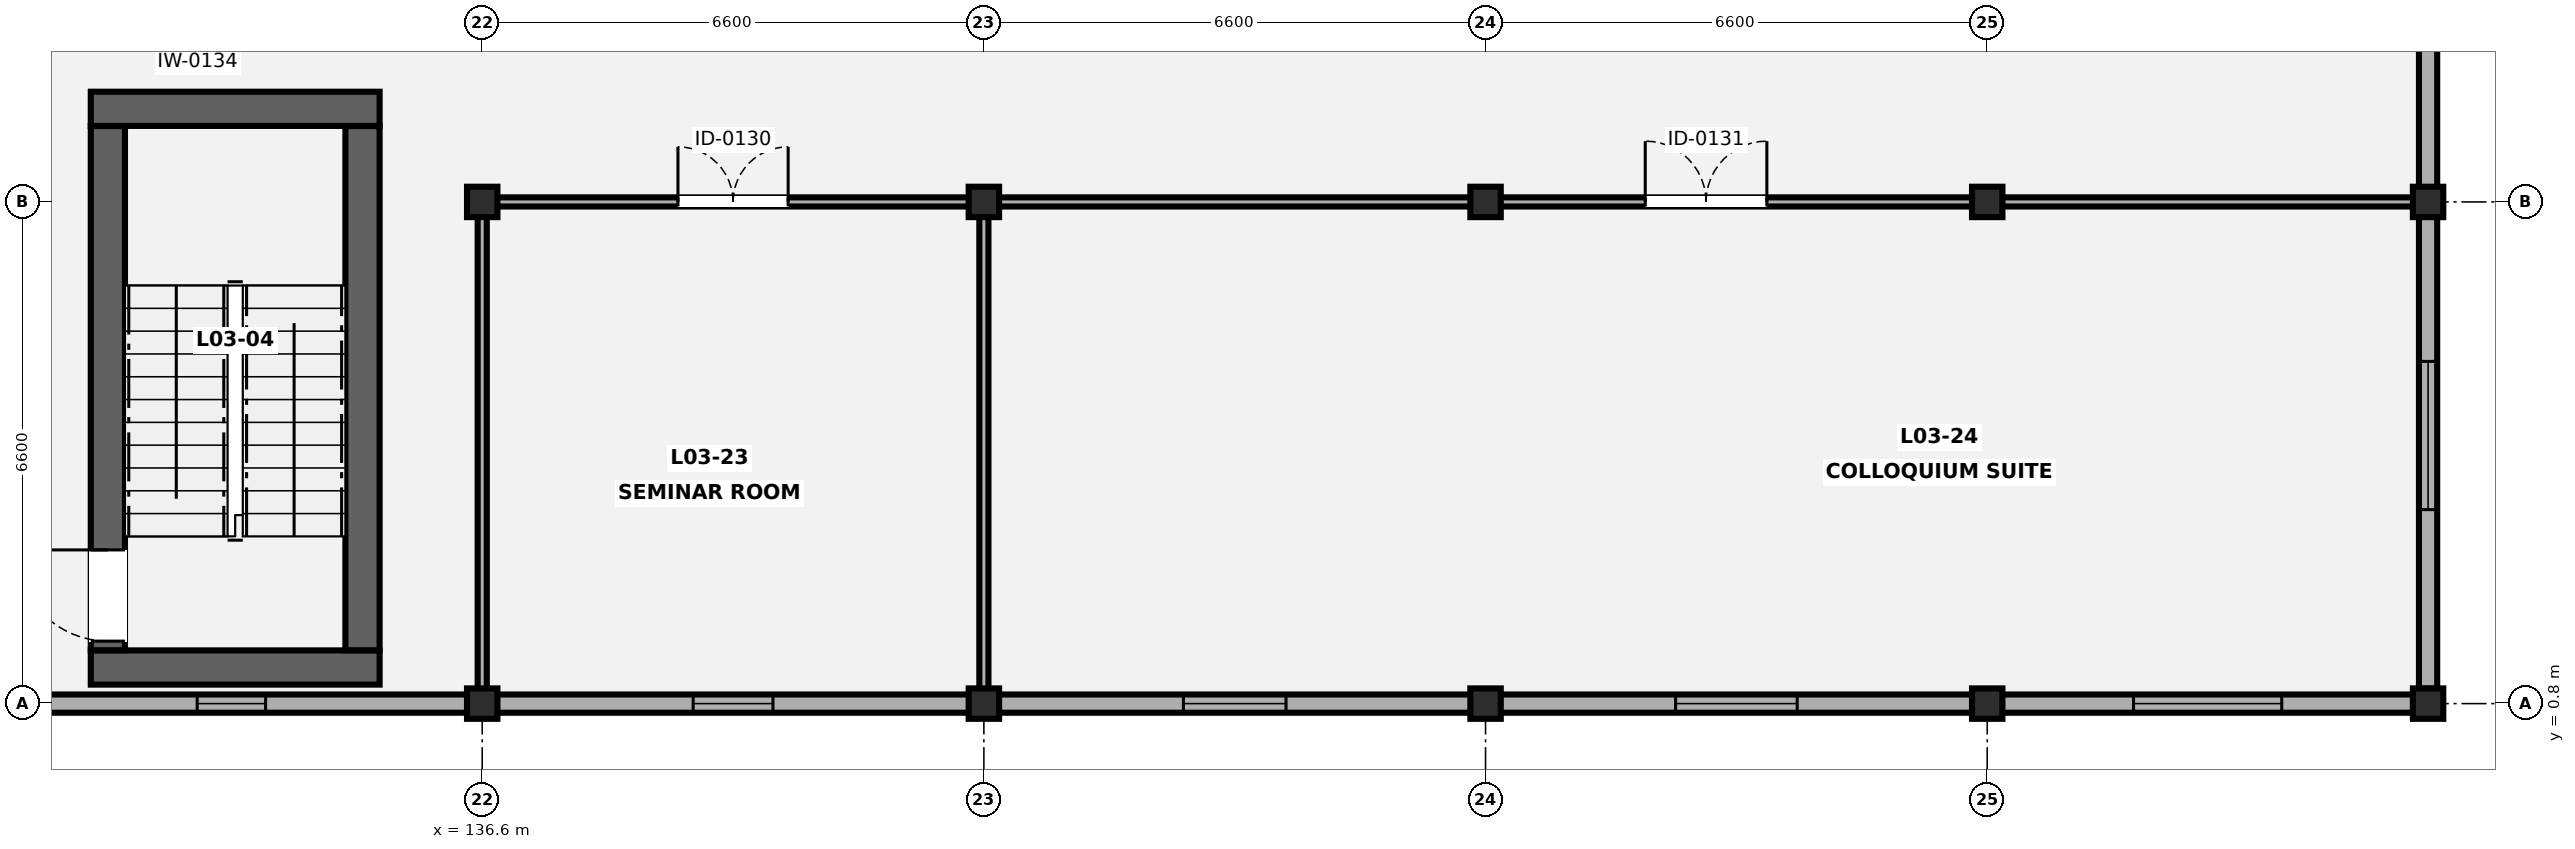
"""IFC4 building model, lengths in metres.
Left out: names, types, materials, properties, quantities, classifications, styles, units other than length and angle.
Written with IfcOpenShell. Run it as: python <this file> out.ifc"""

import sys

from ifc_helpers import new_model, si_unit, direction, frame, frame_2d, origin, origin_2d, place, context, subcontext, project, spatial, rectangle, i_section, extrude, element, fill, save


model = new_model("IFC4")
c1 = context("Model", 3, precision=1e-05, world=origin(), true_north=direction((0.0, 1.0)))
c2 = subcontext(c1, "Body", "Model", "MODEL_VIEW")
j1 = project(units=[si_unit("LENGTHUNIT", "METRE"), si_unit("PLANEANGLEUNIT", "RADIAN")], contexts=[c1])
p1 = place(None, origin())
s1 = spatial("IfcSite", under=j1, at=p1, CompositionType="ELEMENT")
p2 = place(p1, origin())
s2 = spatial("IfcBuilding", under=s1, at=p2, CompositionType="ELEMENT")
p3 = place(p2, frame((0.0, 0.0, 13.3)))
s3 = spatial("IfcBuildingStorey", under=s2, at=p3, CompositionType="ELEMENT", Elevation=13.3)
for number, where, z_axis, x_axis in (
    (1, (136.6, 0.8, 0.0), (0.0, 0.0, 1.0), (1.0, 0.0, 0.0)),
    (2, (136.6, 7.4, 0.0), (0.0, 0.0, 1.0), (1.0, 0.0, 0.0)),
    (3, (143.2, 0.8, 0.0), (0.0, 0.0, 1.0), (1.0, 0.0, 0.0)),
    (4, (143.2, 7.4, 0.0), (0.0, 0.0, 1.0), (1.0, 0.0, 0.0)),
    (5, (149.8, 0.8, 0.0), (0.0, 0.0, 1.0), (1.0, 0.0, 0.0)),
    (6, (149.8, 7.4, 0.0), (0.0, 0.0, 1.0), (1.0, 0.0, 0.0)),
    (7, (156.4, 0.8, 0.0), (0.0, 0.0, 1.0), (1.0, 0.0, 0.0)),
    (8, (156.4, 7.4, 0.0), (0.0, 0.0, 1.0), (1.0, 0.0, 0.0)),
    (9, (162.2, 0.8, 0.0), (0.0, 0.0, 1.0), (1.0, 0.0, 0.0)),
    (10, (162.2, 7.4, 0.0), (0.0, 0.0, 1.0), (1.0, 0.0, 0.0)),
):
    element("IfcColumn", number, at=place(p3, frame(where, z_axis=z_axis, x_axis=x_axis)), inside=s3, PredefinedType="COLUMN", context=c2, shape_type="SweptSolid", body=[
        extrude(i_section(OverallWidth=0.4, OverallDepth=0.4, WebThickness=0.02, FlangeThickness=0.035, FilletRadius=0.016, at=origin_2d()), origin(), (0.0, 0.0, 1.0), 4.2),
    ])
p4 = place(p3, frame((162.2, 20.402, 0.0), z_axis=(0.0, 0.0, 1.0), x_axis=(0.0, -1.0, 0.0)))
e11 = element("IfcWall", 11, at=p4, inside=s3, PredefinedType="SOLIDWALL", context=c2, shape_type="SweptSolid", body=[
    extrude(rectangle(XDim=19.404, YDim=0.24, at=frame_2d((9.702, 0.0))), origin(), (0.0, 0.0, 1.0), 3.372),
])
p5 = place(p4, frame((2.4, 0.0, 0.85)))
e12 = element("IfcOpeningElement", 12, at=p5, cuts=e11, PredefinedType="OPENING", context=c2, shape_type="SweptSolid", body=[
    extrude(rectangle(XDim=1.55, YDim=1.4, at=frame_2d((0.775, 0.7))), frame((0.0, 0.13, 0.0), z_axis=(0.0, -1.0, 0.0), x_axis=(1.0, 0.0, 0.0)), (0.0, 0.0, 1.0), 0.26),
])
p6 = place(p4, frame((15.1, 0.0, 0.85)))
e13 = element("IfcOpeningElement", 13, at=p6, cuts=e11, PredefinedType="OPENING", context=c2, shape_type="SweptSolid", body=[
    extrude(rectangle(XDim=1.95, YDim=1.5, at=frame_2d((0.975, 0.75))), frame((0.0, 0.13, 0.0), z_axis=(0.0, -1.0, 0.0), x_axis=(1.0, 0.0, 0.0)), (0.0, 0.0, 1.0), 0.26),
])
p7 = place(p3, frame((162.002, 0.8, 0.0), z_axis=(0.0, 0.0, 1.0), x_axis=(-1.0, 0.0, 0.0)))
e14 = element("IfcWall", 14, at=p7, inside=s3, PredefinedType="SOLIDWALL", context=c2, shape_type="SweptSolid", body=[
    extrude(rectangle(XDim=58.204, YDim=0.24, at=frame_2d((29.102, 0.0))), origin(), (0.0, 0.0, 1.0), 3.505),
])
p8 = place(p7, frame((54.277, 0.0, 0.85)))
e15 = element("IfcOpeningElement", 15, at=p8, cuts=e14, PredefinedType="OPENING", context=c2, shape_type="SweptSolid", body=[
    extrude(rectangle(XDim=1.65, YDim=1.25, at=frame_2d((0.825, 0.625))), frame((0.0, 0.13, 0.0), z_axis=(0.0, -1.0, 0.0), x_axis=(1.0, 0.0, 0.0)), (0.0, 0.0, 1.0), 0.26),
])
p9 = place(p7, frame((47.552, 0.0, 0.85)))
e16 = element("IfcOpeningElement", 16, at=p9, cuts=e14, PredefinedType="OPENING", context=c2, shape_type="SweptSolid", body=[
    extrude(rectangle(XDim=1.9, YDim=1.25, at=frame_2d((0.95, 0.625))), frame((0.0, 0.13, 0.0), z_axis=(0.0, -1.0, 0.0), x_axis=(1.0, 0.0, 0.0)), (0.0, 0.0, 1.0), 0.26),
])
p10 = place(p7, frame((40.802, 0.0, 0.85)))
e17 = element("IfcOpeningElement", 17, at=p10, cuts=e14, PredefinedType="OPENING", context=c2, shape_type="SweptSolid", body=[
    extrude(rectangle(XDim=2.2, YDim=1.25, at=frame_2d((1.1, 0.625))), frame((0.0, 0.13, 0.0), z_axis=(0.0, -1.0, 0.0), x_axis=(1.0, 0.0, 0.0)), (0.0, 0.0, 1.0), 0.26),
])
p11 = place(p7, frame((34.052, 0.0, 0.85)))
e18 = element("IfcOpeningElement", 18, at=p11, cuts=e14, PredefinedType="OPENING", context=c2, shape_type="SweptSolid", body=[
    extrude(rectangle(XDim=2.5, YDim=1.25, at=frame_2d((1.25, 0.625))), frame((0.0, 0.13, 0.0), z_axis=(0.0, -1.0, 0.0), x_axis=(1.0, 0.0, 0.0)), (0.0, 0.0, 1.0), 0.26),
])
p12 = place(p7, frame((28.252, 0.0, 0.85)))
e19 = element("IfcOpeningElement", 19, at=p12, cuts=e14, PredefinedType="OPENING", context=c2, shape_type="SweptSolid", body=[
    extrude(rectangle(XDim=0.9, YDim=1.35, at=frame_2d((0.45, 0.675))), frame((0.0, 0.13, 0.0), z_axis=(0.0, -1.0, 0.0), x_axis=(1.0, 0.0, 0.0)), (0.0, 0.0, 1.0), 0.26),
])
p13 = place(p7, frame((21.577, 0.0, 0.85)))
e20 = element("IfcOpeningElement", 20, at=p13, cuts=e14, PredefinedType="OPENING", context=c2, shape_type="SweptSolid", body=[
    extrude(rectangle(XDim=1.05, YDim=1.35, at=frame_2d((0.525, 0.675))), frame((0.0, 0.13, 0.0), z_axis=(0.0, -1.0, 0.0), x_axis=(1.0, 0.0, 0.0)), (0.0, 0.0, 1.0), 0.26),
])
p14 = place(p7, frame((14.827, 0.0, 0.85)))
e21 = element("IfcOpeningElement", 21, at=p14, cuts=e14, PredefinedType="OPENING", context=c2, shape_type="SweptSolid", body=[
    extrude(rectangle(XDim=1.35, YDim=1.5, at=frame_2d((0.675, 0.75))), frame((0.0, 0.13, 0.0), z_axis=(0.0, -1.0, 0.0), x_axis=(1.0, 0.0, 0.0)), (0.0, 0.0, 1.0), 0.26),
])
p15 = place(p7, frame((8.102, 0.0, 0.85)))
e22 = element("IfcOpeningElement", 22, at=p15, cuts=e14, PredefinedType="OPENING", context=c2, shape_type="SweptSolid", body=[
    extrude(rectangle(XDim=1.6, YDim=1.5, at=frame_2d((0.8, 0.75))), frame((0.0, 0.13, 0.0), z_axis=(0.0, -1.0, 0.0), x_axis=(1.0, 0.0, 0.0)), (0.0, 0.0, 1.0), 0.26),
])
p16 = place(p7, frame((1.727, 0.0, 0.85)))
e23 = element("IfcOpeningElement", 23, at=p16, cuts=e14, PredefinedType="OPENING", context=c2, shape_type="SweptSolid", body=[
    extrude(rectangle(XDim=1.95, YDim=1.5, at=frame_2d((0.975, 0.75))), frame((0.0, 0.13, 0.0), z_axis=(0.0, -1.0, 0.0), x_axis=(1.0, 0.0, 0.0)), (0.0, 0.0, 1.0), 0.26),
])
for number, where, z_axis, x_axis in (
    (24, (131.45, 1.275, 0.0), (0.0, 0.0, 1.0), (1.0, 0.0, 0.0)),
    (25, (131.45, 8.625, 0.0), (0.0, 0.0, 1.0), (1.0, 0.0, 0.0)),
):
    element("IfcWall", number, at=place(p3, frame(where, z_axis=z_axis, x_axis=x_axis)), inside=s3, PredefinedType="SHEAR", context=c2, shape_type="SweptSolid", body=[
        extrude(rectangle(XDim=3.8, YDim=0.45, at=frame_2d((1.9, 0.0))), origin(), (0.0, 0.0, 1.0), 4.02),
    ])
p17 = place(p3, frame((131.675, 1.502, 0.0), z_axis=(0.0, 0.0, 1.0), x_axis=(0.0, 1.0, 0.0)))
e26 = element("IfcWall", 26, at=p17, inside=s3, PredefinedType="SHEAR", context=c2, shape_type="SweptSolid", body=[
    extrude(rectangle(XDim=6.896, YDim=0.45, at=frame_2d((3.448, 0.0))), origin(), (0.0, 0.0, 1.0), 4.02),
])
p18 = place(p17, frame((0.12, 0.0, 0.0)))
e27 = element("IfcOpeningElement", 27, at=p18, cuts=e26, PredefinedType="OPENING", context=c2, shape_type="SweptSolid", body=[
    extrude(rectangle(XDim=1.2, YDim=2.15, at=frame_2d((0.6, 1.075))), frame((0.0, 0.235, 0.0), z_axis=(0.0, -1.0, 0.0), x_axis=(1.0, 0.0, 0.0)), (0.0, 0.0, 1.0), 0.47),
])
p19 = place(p3, frame((135.025, 1.502, 0.0), z_axis=(0.0, 0.0, 1.0), x_axis=(0.0, 1.0, 0.0)))
e28 = element("IfcWall", 28, at=p19, inside=s3, PredefinedType="SHEAR", context=c2, shape_type="SweptSolid", body=[
    extrude(rectangle(XDim=6.896, YDim=0.45, at=frame_2d((3.448, 0.0))), origin(), (0.0, 0.0, 1.0), 4.02),
])
p20 = place(p3, frame((136.6, 7.4, 0.0), z_axis=(0.0, 0.0, 1.0), x_axis=(1.0, 0.0, 0.0)))
e29 = element("IfcWall", 29, at=p20, inside=s3, PredefinedType="PARTITIONING", context=c2, shape_type="SweptSolid", body=[
    extrude(rectangle(XDim=6.6, YDim=0.12, at=frame_2d((3.3, 0.0))), origin(), (0.0, 0.0, 1.0), 3.293),
])
p21 = place(p20, frame((2.575, 0.0, 0.0)))
e30 = element("IfcOpeningElement", 30, at=p21, cuts=e29, PredefinedType="OPENING", context=c2, shape_type="SweptSolid", body=[
    extrude(rectangle(XDim=1.45, YDim=2.12, at=frame_2d((0.725, 1.06))), frame((0.0, 0.07, 0.0), z_axis=(0.0, -1.0, 0.0), x_axis=(1.0, 0.0, 0.0)), (0.0, 0.0, 1.0), 0.14),
])
p22 = place(p3, frame((136.6, 0.8, 0.0), z_axis=(0.0, 0.0, 1.0), x_axis=(0.0, 1.0, 0.0)))
e31 = element("IfcWall", 31, at=p22, inside=s3, PredefinedType="PARTITIONING", context=c2, shape_type="SweptSolid", body=[
    extrude(rectangle(XDim=6.538, YDim=0.12, at=frame_2d((3.269, 0.0))), origin(), (0.0, 0.0, 1.0), 3.372),
])
p23 = place(p3, frame((143.2, 0.8, 0.0), z_axis=(0.0, 0.0, 1.0), x_axis=(0.0, 1.0, 0.0)))
e32 = element("IfcWall", 32, at=p23, inside=s3, PredefinedType="PARTITIONING", context=c2, shape_type="SweptSolid", body=[
    extrude(rectangle(XDim=6.6, YDim=0.12, at=frame_2d((3.3, 0.0))), origin(), (0.0, 0.0, 1.0), 3.372),
])
p24 = place(p3, frame((143.202, 7.4, 0.0), z_axis=(0.0, 0.0, 1.0), x_axis=(1.0, 0.0, 0.0)))
e33 = element("IfcWall", 33, at=p24, inside=s3, PredefinedType="PARTITIONING", context=c2, shape_type="SweptSolid", body=[
    extrude(rectangle(XDim=18.998, YDim=0.12, at=frame_2d((9.499, 0.0))), origin(), (0.0, 0.0, 1.0), 3.293),
])
p25 = place(p24, frame((8.699, 0.0, 0.0)))
e34 = element("IfcOpeningElement", 34, at=p25, cuts=e33, PredefinedType="OPENING", context=c2, shape_type="SweptSolid", body=[
    extrude(rectangle(XDim=1.6, YDim=2.18, at=frame_2d((0.8, 1.09))), frame((0.0, 0.07, 0.0), z_axis=(0.0, -1.0, 0.0), x_axis=(1.0, 0.0, 0.0)), (0.0, 0.0, 1.0), 0.14),
])
p26 = place(p6, origin())
e35 = element("IfcWindow", 35, at=p26, inside=s3, PartitioningType="SINGLE_PANEL", PredefinedType="WINDOW", context=c2, shape_type="SweptSolid", body=[
    extrude(rectangle(XDim=1.95, YDim=1.5, at=frame_2d((0.975, 0.75))), frame((0.0, 0.03, 0.0), z_axis=(0.0, -1.0, 0.0), x_axis=(1.0, 0.0, 0.0)), (0.0, 0.0, 1.0), 0.06),
])
fill(e13, e35)
p27 = place(p12, origin())
e36 = element("IfcWindow", 36, at=p27, inside=s3, PartitioningType="SINGLE_PANEL", PredefinedType="WINDOW", context=c2, shape_type="SweptSolid", body=[
    extrude(rectangle(XDim=0.9, YDim=1.35, at=frame_2d((0.45, 0.675))), frame((0.0, 0.03, 0.0), z_axis=(0.0, -1.0, 0.0), x_axis=(1.0, 0.0, 0.0)), (0.0, 0.0, 1.0), 0.06),
])
fill(e19, e36)
p28 = place(p13, origin())
e37 = element("IfcWindow", 37, at=p28, inside=s3, PartitioningType="SINGLE_PANEL", PredefinedType="WINDOW", context=c2, shape_type="SweptSolid", body=[
    extrude(rectangle(XDim=1.05, YDim=1.35, at=frame_2d((0.525, 0.675))), frame((0.0, 0.03, 0.0), z_axis=(0.0, -1.0, 0.0), x_axis=(1.0, 0.0, 0.0)), (0.0, 0.0, 1.0), 0.06),
])
fill(e20, e37)
p29 = place(p14, origin())
e38 = element("IfcWindow", 38, at=p29, inside=s3, PartitioningType="SINGLE_PANEL", PredefinedType="WINDOW", context=c2, shape_type="SweptSolid", body=[
    extrude(rectangle(XDim=1.35, YDim=1.5, at=frame_2d((0.675, 0.75))), frame((0.0, 0.03, 0.0), z_axis=(0.0, -1.0, 0.0), x_axis=(1.0, 0.0, 0.0)), (0.0, 0.0, 1.0), 0.06),
])
fill(e21, e38)
p30 = place(p15, origin())
e39 = element("IfcWindow", 39, at=p30, inside=s3, PartitioningType="SINGLE_PANEL", PredefinedType="WINDOW", context=c2, shape_type="SweptSolid", body=[
    extrude(rectangle(XDim=1.6, YDim=1.5, at=frame_2d((0.8, 0.75))), frame((0.0, 0.03, 0.0), z_axis=(0.0, -1.0, 0.0), x_axis=(1.0, 0.0, 0.0)), (0.0, 0.0, 1.0), 0.06),
])
fill(e22, e39)
p31 = place(p16, origin())
e40 = element("IfcWindow", 40, at=p31, inside=s3, PartitioningType="SINGLE_PANEL", PredefinedType="WINDOW", context=c2, shape_type="SweptSolid", body=[
    extrude(rectangle(XDim=1.95, YDim=1.5, at=frame_2d((0.975, 0.75))), frame((0.0, 0.03, 0.0), z_axis=(0.0, -1.0, 0.0), x_axis=(1.0, 0.0, 0.0)), (0.0, 0.0, 1.0), 0.06),
])
fill(e23, e40)
p32 = place(p18, origin())
e41 = element("IfcDoor", 41, at=p32, inside=s3, OperationType="SINGLE_SWING_RIGHT", PredefinedType="DOOR", context=c2, shape_type="SweptSolid", body=[
    extrude(rectangle(XDim=1.2, YDim=2.15, at=frame_2d((0.6, 1.075))), frame((0.0, 0.025, 0.0), z_axis=(0.0, -1.0, 0.0), x_axis=(1.0, 0.0, 0.0)), (0.0, 0.0, 1.0), 0.05),
])
fill(e27, e41)
p33 = place(p21, origin())
e42 = element("IfcDoor", 42, at=p33, inside=s3, OperationType="DOUBLE_DOOR_SINGLE_SWING", PredefinedType="DOOR", context=c2, shape_type="SweptSolid", body=[
    extrude(rectangle(XDim=1.45, YDim=2.12, at=frame_2d((0.725, 1.06))), frame((0.0, 0.025, 0.0), z_axis=(0.0, -1.0, 0.0), x_axis=(1.0, 0.0, 0.0)), (0.0, 0.0, 1.0), 0.05),
])
fill(e30, e42)
p34 = place(p25, origin())
e43 = element("IfcDoor", 43, at=p34, inside=s3, OperationType="DOUBLE_DOOR_SINGLE_SWING", PredefinedType="DOOR", context=c2, shape_type="SweptSolid", body=[
    extrude(rectangle(XDim=1.6, YDim=2.18, at=frame_2d((0.8, 1.09))), frame((0.0, 0.025, 0.0), z_axis=(0.0, -1.0, 0.0), x_axis=(1.0, 0.0, 0.0)), (0.0, 0.0, 1.0), 0.05),
])
fill(e34, e43)
save(model, sys.argv[1])
